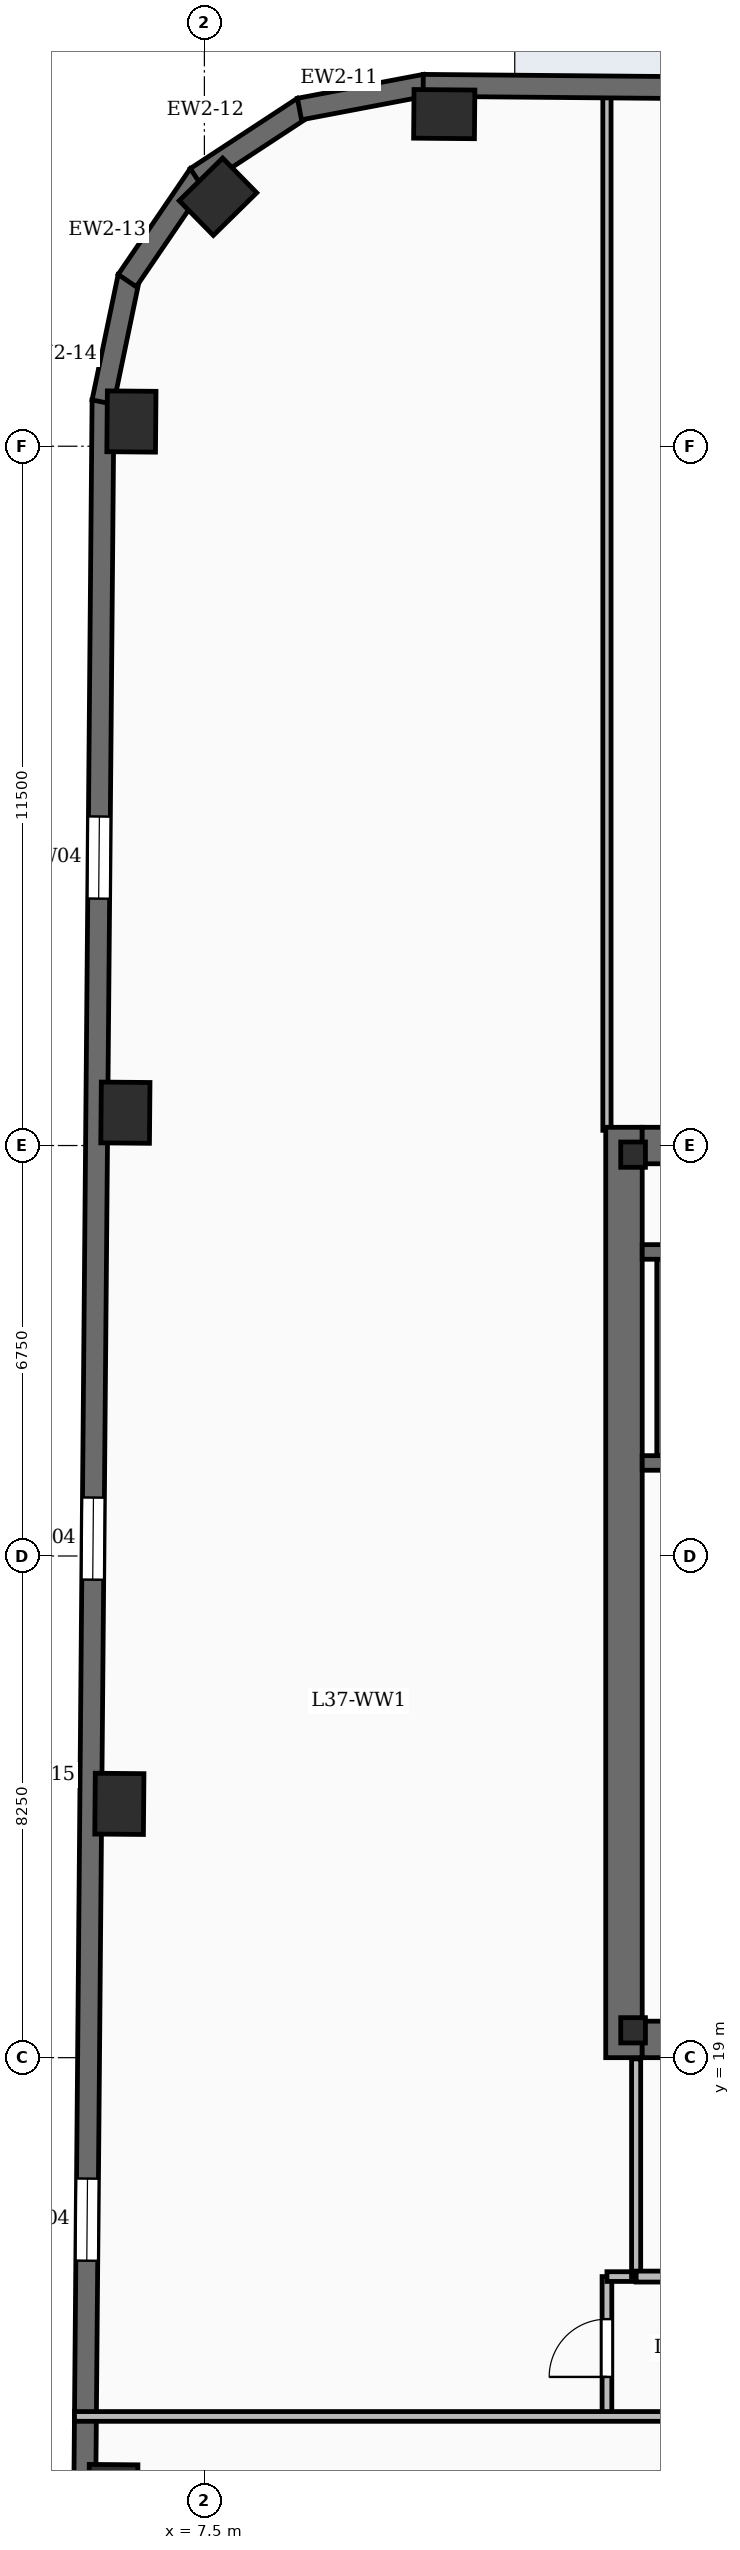
"""IFC4 building model, lengths in metres.
Left out: names, types, materials, properties, quantities, classifications, styles, units other than length and angle.
Written with IfcOpenShell. Run it as: python <this file> out.ifc"""

import sys

from ifc_helpers import new_model, si_unit, direction, frame, frame_2d, origin, origin_2d, place, context, subcontext, project, spatial, rectangle, i_section, extrude, element, fill, save


model = new_model("IFC4")
c1 = context("Model", 3, precision=1e-05, world=origin(), true_north=direction((0.0, 1.0)))
c2 = subcontext(c1, "Body", "Model", "MODEL_VIEW")
j1 = project(units=[si_unit("LENGTHUNIT", "METRE"), si_unit("PLANEANGLEUNIT", "RADIAN")], contexts=[c1])
p1 = place(None, origin())
s1 = spatial("IfcSite", under=j1, at=p1, CompositionType="ELEMENT")
p2 = place(p1, origin())
s2 = spatial("IfcBuilding", under=s1, at=p2, CompositionType="ELEMENT")
p3 = place(p2, frame((0.0, 0.0, 158.45)))
s3 = spatial("IfcBuildingStorey", under=s2, at=p3, CompositionType="ELEMENT", Elevation=158.45)
p4 = place(p3, frame((14.4, 19.0, -0.45), z_axis=(0.0, 0.0, 1.0), x_axis=(0.0, 1.0, 0.0)))
e1 = element("IfcWall", 1, at=p4, inside=s3, PredefinedType="SHEAR", context=c2, shape_type="SweptSolid", body=[
    extrude(rectangle(XDim=15.3, YDim=0.6, at=frame_2d((7.65, 0.0))), origin(), (0.0, 0.0, 1.0), 3.93),
])
for number, where, z_axis, x_axis in (
    (2, (14.7, 19.3, -0.45), (0.0, 0.0, 1.0), (1.0, 0.0, 0.0)),
    (3, (14.7, 34.0, -0.45), (0.0, 0.0, 1.0), (1.0, 0.0, 0.0)),
):
    element("IfcWall", number, at=place(p3, frame(where, z_axis=z_axis, x_axis=x_axis)), inside=s3, PredefinedType="SHEAR", context=c2, shape_type="SweptSolid", body=[
        extrude(rectangle(XDim=9.5, YDim=0.6, at=frame_2d((4.75, 0.0))), origin(), (0.0, 0.0, 1.0), 3.93),
    ])
for number, where, z_axis, x_axis in (
    (4, (14.55, 19.45, -0.45), (0.0, 0.0, 1.0), (1.0, 0.0, 0.0)),
    (5, (14.55, 33.85, -0.45), (0.0, 0.0, 1.0), (1.0, 0.0, 0.0)),
):
    element("IfcColumn", number, at=place(p3, frame(where, z_axis=z_axis, x_axis=x_axis)), inside=s3, PredefinedType="COLUMN", context=c2, shape_type="SweptSolid", body=[
        extrude(i_section(OverallWidth=0.406, OverallDepth=0.416, WebThickness=0.03, FlangeThickness=0.048, FilletRadius=0.02, at=origin_2d()), origin(), (0.0, 0.0, 1.0), 3.93),
    ])
for number, where, z_axis, x_axis in (
    (6, (11.444, 50.962, -0.45), (0.0, 0.0, 1.0), (1.0, -0.009, 0.0)),
    (7, (7.723, 49.603, -0.45), (0.0, 0.0, 1.0), (0.713, 0.701, 0.0)),
    (8, (6.3, 45.906, -0.45), (0.0, 0.0, 1.0), (0.009, 1.0, 0.0)),
    (9, (6.201, 34.54, -0.45), (0.0, 0.0, 1.0), (0.009, 1.0, 0.0)),
    (10, (6.102, 23.174, -0.45), (0.0, 0.0, 1.0), (0.009, 1.0, 0.0)),
    (11, (6.002, 11.808, -0.45), (0.0, 0.0, 1.0), (0.009, 1.0, 0.0)),
):
    element("IfcColumn", number, at=place(p3, frame(where, z_axis=z_axis, x_axis=x_axis)), inside=s3, PredefinedType="COLUMN", context=c2, shape_type="SweptSolid", body=[
        extrude(rectangle(XDim=1.0, YDim=0.8, at=origin_2d()), origin(), (0.0, 0.0, 1.0), 3.93),
    ])
p5 = place(p3, frame((11.098, 51.435, 0.0), z_axis=(0.0, 0.0, 1.0), x_axis=(0.99996191194, -0.008727810138, 0.0)))
e12 = element("IfcWall", 12, at=p5, inside=s3, PredefinedType="SOLIDWALL", context=c2, shape_type="SweptSolid", body=[
    extrude(rectangle(XDim=49.4, YDim=0.36, at=frame_2d((24.7, 0.0))), origin(), (0.0, 0.0, 1.0), 3.48),
])
p6 = place(p5, frame((27.6, 0.0, 0.0)))
e13 = element("IfcOpeningElement", 13, at=p6, cuts=e12, PredefinedType="OPENING", context=c2, shape_type="SweptSolid", body=[
    extrude(rectangle(XDim=1.8, YDim=2.25, at=frame_2d((0.9, 1.125))), frame((0.0, 0.19, 0.0), z_axis=(0.0, -1.0, 0.0), x_axis=(1.0, 0.0, 0.0)), (0.0, 0.0, 1.0), 0.38),
])
p7 = place(p5, frame((8.0, 0.0, 0.88)))
e14 = element("IfcOpeningElement", 14, at=p7, cuts=e12, PredefinedType="OPENING", context=c2, shape_type="SweptSolid", body=[
    extrude(rectangle(XDim=1.8, YDim=2.15, at=frame_2d((0.9, 1.075))), frame((0.0, 0.19, 0.0), z_axis=(0.0, -1.0, 0.0), x_axis=(1.0, 0.0, 0.0)), (0.0, 0.0, 1.0), 0.38),
])
p8 = place(p5, frame((18.8, 0.0, 0.88)))
e15 = element("IfcOpeningElement", 15, at=p8, cuts=e12, PredefinedType="OPENING", context=c2, shape_type="SweptSolid", body=[
    extrude(rectangle(XDim=1.8, YDim=2.15, at=frame_2d((0.9, 1.075))), frame((0.0, 0.19, 0.0), z_axis=(0.0, -1.0, 0.0), x_axis=(1.0, 0.0, 0.0)), (0.0, 0.0, 1.0), 0.38),
])
p9 = place(p5, frame((40.4, 0.0, 0.88)))
e16 = element("IfcOpeningElement", 16, at=p9, cuts=e12, PredefinedType="OPENING", context=c2, shape_type="SweptSolid", body=[
    extrude(rectangle(XDim=1.8, YDim=2.15, at=frame_2d((0.9, 1.075))), frame((0.0, 0.19, 0.0), z_axis=(0.0, -1.0, 0.0), x_axis=(1.0, 0.0, 0.0)), (0.0, 0.0, 1.0), 0.38),
])
p10 = place(p3, frame((9.063, 51.045, 0.0), z_axis=(0.0, 0.0, 1.0), x_axis=(0.982445905584, 0.186547695246, 0.0)))
e17 = element("IfcWall", 17, at=p10, inside=s3, PredefinedType="SOLIDWALL", context=c2, shape_type="SweptSolid", body=[
    extrude(rectangle(XDim=2.107, YDim=0.36, at=frame_2d((1.054, 0.0))), origin(), (0.0, 0.0, 1.0), 3.48),
])
for number, where, z_axis, x_axis in (
    (18, (7.367, 49.916, 0.0), (0.0, 0.0, 1.0), (0.836, 0.548, 0.0)),
    (19, (6.231, 48.223, 0.0), (0.0, 0.0, 1.0), (0.563, 0.827, 0.0)),
    (20, (5.829, 46.225, 0.0), (0.0, 0.0, 1.0), (0.204, 0.979, 0.0)),
):
    element("IfcWall", number, at=place(p3, frame(where, z_axis=z_axis, x_axis=x_axis)), inside=s3, PredefinedType="SOLIDWALL", context=c2, shape_type="SweptSolid", body=[
        extrude(rectangle(XDim=2.107, YDim=0.36, at=frame_2d((1.053, 0.0))), origin(), (0.0, 0.0, 1.0), 3.48),
    ])
p11 = place(p3, frame((5.529, 11.462, 0.0), z_axis=(0.0, 0.0, 1.0), x_axis=(0.008727287311, 0.999961916503, 0.0)))
e21 = element("IfcWall", 21, at=p11, inside=s3, PredefinedType="SOLIDWALL", context=c2, shape_type="SweptSolid", body=[
    extrude(rectangle(XDim=34.8, YDim=0.36, at=frame_2d((17.4, 0.0))), origin(), (0.0, 0.0, 1.0), 3.48),
])
p12 = place(p11, frame((4.2, 0.0, 0.88)))
e22 = element("IfcOpeningElement", 22, at=p12, cuts=e21, PredefinedType="OPENING", context=c2, shape_type="SweptSolid", body=[
    extrude(rectangle(XDim=1.35, YDim=2.2, at=frame_2d((0.675, 1.1))), frame((0.0, 0.19, 0.0), z_axis=(0.0, -1.0, 0.0), x_axis=(1.0, 0.0, 0.0)), (0.0, 0.0, 1.0), 0.38),
])
p13 = place(p11, frame((15.4, 0.0, 0.88)))
e23 = element("IfcOpeningElement", 23, at=p13, cuts=e21, PredefinedType="OPENING", context=c2, shape_type="SweptSolid", body=[
    extrude(rectangle(XDim=1.35, YDim=2.2, at=frame_2d((0.675, 1.1))), frame((0.0, 0.19, 0.0), z_axis=(0.0, -1.0, 0.0), x_axis=(1.0, 0.0, 0.0)), (0.0, 0.0, 1.0), 0.38),
])
p14 = place(p11, frame((26.6, 0.0, 0.88)))
e24 = element("IfcOpeningElement", 24, at=p14, cuts=e21, PredefinedType="OPENING", context=c2, shape_type="SweptSolid", body=[
    extrude(rectangle(XDim=1.35, YDim=2.2, at=frame_2d((0.675, 1.1))), frame((0.0, 0.19, 0.0), z_axis=(0.0, -1.0, 0.0), x_axis=(1.0, 0.0, 0.0)), (0.0, 0.0, 1.0), 0.38),
])
p15 = place(p3, frame((24.2, 28.78, 0.0), z_axis=(0.0, 0.0, 1.0), x_axis=(-1.0, 0.0, 0.0)))
e25 = element("IfcWall", 25, at=p15, inside=s3, PredefinedType="SOLIDWALL", context=c2, shape_type="SweptSolid", body=[
    extrude(rectangle(XDim=9.5, YDim=0.24, at=frame_2d((4.75, 0.0))), origin(), (0.0, 0.0, 1.0), 3.48),
])
p16 = place(p15, frame((7.68, 0.0, 0.0)))
e26 = element("IfcOpeningElement", 26, at=p16, cuts=e25, PredefinedType="OPENING", context=c2, shape_type="SweptSolid", body=[
    extrude(rectangle(XDim=1.1, YDim=2.15, at=frame_2d((0.55, 1.075))), frame((0.0, 0.13, 0.0), z_axis=(0.0, -1.0, 0.0), x_axis=(1.0, 0.0, 0.0)), (0.0, 0.0, 1.0), 0.26),
])
p17 = place(p3, frame((14.7, 32.25, 0.0), z_axis=(0.0, 0.0, 1.0), x_axis=(1.0, 0.0, 0.0)))
e27 = element("IfcWall", 27, at=p17, inside=s3, PredefinedType="SOLIDWALL", context=c2, shape_type="SweptSolid", body=[
    extrude(rectangle(XDim=9.5, YDim=0.24, at=frame_2d((4.75, 0.0))), origin(), (0.0, 0.0, 1.0), 3.48),
])
p18 = place(p3, frame((15.06, 28.9, 0.0), z_axis=(0.0, 0.0, 1.0), x_axis=(0.0, 1.0, 0.0)))
e28 = element("IfcWall", 28, at=p18, inside=s3, PredefinedType="SOLIDWALL", context=c2, shape_type="SweptSolid", body=[
    extrude(rectangle(XDim=3.23, YDim=0.24, at=frame_2d((1.615, 0.0))), origin(), (0.0, 0.0, 1.0), 3.48),
])
p19 = place(p3, frame((14.6, 15.4, 0.0), z_axis=(0.0, 0.0, 1.0), x_axis=(1.0, 0.0, 0.0)))
e29 = element("IfcWall", 29, at=p19, inside=s3, PredefinedType="PARTITIONING", context=c2, shape_type="SweptSolid", body=[
    extrude(rectangle(XDim=9.9, YDim=0.18, at=frame_2d((4.95, 0.0))), origin(), (0.0, 0.0, 1.0), 2.54),
])
p20 = place(p19, frame((0.74, 0.0, 0.0)))
e30 = element("IfcOpeningElement", 30, at=p20, cuts=e29, PredefinedType="OPENING", context=c2, shape_type="SweptSolid", body=[
    extrude(rectangle(XDim=0.92, YDim=2.1, at=frame_2d((0.46, 1.05))), frame((0.0, 0.1, 0.0), z_axis=(0.0, -1.0, 0.0), x_axis=(1.0, 0.0, 0.0)), (0.0, 0.0, 1.0), 0.2),
])
p21 = place(p19, frame((3.19, 0.0, 0.0)))
e31 = element("IfcOpeningElement", 31, at=p21, cuts=e29, PredefinedType="OPENING", context=c2, shape_type="SweptSolid", body=[
    extrude(rectangle(XDim=0.92, YDim=2.1, at=frame_2d((0.46, 1.05))), frame((0.0, 0.1, 0.0), z_axis=(0.0, -1.0, 0.0), x_axis=(1.0, 0.0, 0.0)), (0.0, 0.0, 1.0), 0.2),
])
p22 = place(p19, frame((5.69, 0.0, 0.0)))
e32 = element("IfcOpeningElement", 32, at=p22, cuts=e29, PredefinedType="OPENING", context=c2, shape_type="SweptSolid", body=[
    extrude(rectangle(XDim=0.92, YDim=2.1, at=frame_2d((0.46, 1.05))), frame((0.0, 0.1, 0.0), z_axis=(0.0, -1.0, 0.0), x_axis=(1.0, 0.0, 0.0)), (0.0, 0.0, 1.0), 0.2),
])
p23 = place(p19, frame((8.19, 0.0, 0.0)))
e33 = element("IfcOpeningElement", 33, at=p23, cuts=e29, PredefinedType="OPENING", context=c2, shape_type="SweptSolid", body=[
    extrude(rectangle(XDim=0.92, YDim=2.1, at=frame_2d((0.46, 1.05))), frame((0.0, 0.1, 0.0), z_axis=(0.0, -1.0, 0.0), x_axis=(1.0, 0.0, 0.0)), (0.0, 0.0, 1.0), 0.2),
])
p24 = place(p3, frame((14.6, 15.4, 0.0), z_axis=(0.0, 0.0, 1.0), x_axis=(0.0, 1.0, 0.0)))
e34 = element("IfcWall", 34, at=p24, inside=s3, PredefinedType="PARTITIONING", context=c2, shape_type="SweptSolid", body=[
    extrude(rectangle(XDim=3.58, YDim=0.15, at=frame_2d((1.79, 0.0))), origin(), (0.0, 0.0, 1.0), 2.54),
])
p25 = place(p3, frame((5.364, 13.1, 0.0), z_axis=(0.0, 0.0, 1.0), x_axis=(1.0, 0.0, 0.0)))
e35 = element("IfcWall", 35, at=p25, inside=s3, PredefinedType="PARTITIONING", context=c2, shape_type="SweptSolid", body=[
    extrude(rectangle(XDim=60.202, YDim=0.16, at=frame_2d((30.101, 0.0))), origin(), (0.0, 0.0, 1.0), 2.54),
])
p26 = place(p25, frame((14.361, 0.0, 0.0)))
e36 = element("IfcOpeningElement", 36, at=p26, cuts=e35, PredefinedType="OPENING", context=c2, shape_type="SweptSolid", body=[
    extrude(rectangle(XDim=0.95, YDim=2.15, at=frame_2d((0.475, 1.075))), frame((0.0, 0.09, 0.0), z_axis=(0.0, -1.0, 0.0), x_axis=(1.0, 0.0, 0.0)), (0.0, 0.0, 1.0), 0.18),
])
p27 = place(p25, frame((23.311, 0.0, 0.0)))
e37 = element("IfcOpeningElement", 37, at=p27, cuts=e35, PredefinedType="OPENING", context=c2, shape_type="SweptSolid", body=[
    extrude(rectangle(XDim=0.95, YDim=2.15, at=frame_2d((0.475, 1.075))), frame((0.0, 0.09, 0.0), z_axis=(0.0, -1.0, 0.0), x_axis=(1.0, 0.0, 0.0)), (0.0, 0.0, 1.0), 0.18),
])
p28 = place(p25, frame((36.161, 0.0, 0.0)))
e38 = element("IfcOpeningElement", 38, at=p28, cuts=e35, PredefinedType="OPENING", context=c2, shape_type="SweptSolid", body=[
    extrude(rectangle(XDim=0.95, YDim=2.15, at=frame_2d((0.475, 1.075))), frame((0.0, 0.09, 0.0), z_axis=(0.0, -1.0, 0.0), x_axis=(1.0, 0.0, 0.0)), (0.0, 0.0, 1.0), 0.18),
])
p29 = place(p25, frame((47.911, 0.0, 0.0)))
e39 = element("IfcOpeningElement", 39, at=p29, cuts=e35, PredefinedType="OPENING", context=c2, shape_type="SweptSolid", body=[
    extrude(rectangle(XDim=0.95, YDim=2.15, at=frame_2d((0.475, 1.075))), frame((0.0, 0.09, 0.0), z_axis=(0.0, -1.0, 0.0), x_axis=(1.0, 0.0, 0.0)), (0.0, 0.0, 1.0), 0.18),
])
p30 = place(p3, frame((14.12, 34.25, 0.0), z_axis=(0.0, 0.0, 1.0), x_axis=(0.0, 1.0, 0.0)))
e40 = element("IfcWall", 40, at=p30, inside=s3, PredefinedType="PARTITIONING", context=c2, shape_type="SweptSolid", body=[
    extrude(rectangle(XDim=17.098, YDim=0.135, at=frame_2d((8.549, 0.0))), origin(), (0.0, 0.0, 1.0), 2.54),
])
p31 = place(p3, frame((14.12, 13.1, 0.0), z_axis=(0.0, 0.0, 1.0), x_axis=(0.0, 1.0, 0.0)))
e41 = element("IfcWall", 41, at=p31, inside=s3, PredefinedType="PARTITIONING", context=c2, shape_type="SweptSolid", body=[
    extrude(rectangle(XDim=2.3, YDim=0.16, at=frame_2d((1.15, 0.0))), origin(), (0.0, 0.0, 1.0), 2.54),
])
p32 = place(p31, frame((0.65, 0.0, 0.0)))
e42 = element("IfcOpeningElement", 42, at=p32, cuts=e41, PredefinedType="OPENING", context=c2, shape_type="SweptSolid", body=[
    extrude(rectangle(XDim=0.95, YDim=2.15, at=frame_2d((0.475, 1.075))), frame((0.0, 0.09, 0.0), z_axis=(0.0, -1.0, 0.0), x_axis=(1.0, 0.0, 0.0)), (0.0, 0.0, 1.0), 0.18),
])
p33 = place(p3, frame((14.12, 15.4, 0.0), z_axis=(0.0, 0.0, 1.0), x_axis=(1.0, 0.0, 0.0)))
e43 = element("IfcWall", 43, at=p33, inside=s3, PredefinedType="PARTITIONING", context=c2, shape_type="SweptSolid", body=[
    extrude(rectangle(XDim=0.5, YDim=0.16, at=frame_2d((0.25, 0.0))), origin(), (0.0, 0.0, 1.0), 2.54),
])
p34 = place(p12, origin())
e44 = element("IfcWindow", 44, at=p34, inside=s3, PartitioningType="SINGLE_PANEL", PredefinedType="WINDOW", context=c2, shape_type="SweptSolid", body=[
    extrude(rectangle(XDim=1.35, YDim=2.2, at=frame_2d((0.675, 1.1))), frame((0.0, 0.03, 0.0), z_axis=(0.0, -1.0, 0.0), x_axis=(1.0, 0.0, 0.0)), (0.0, 0.0, 1.0), 0.06),
])
fill(e22, e44)
p35 = place(p13, origin())
e45 = element("IfcWindow", 45, at=p35, inside=s3, PartitioningType="SINGLE_PANEL", PredefinedType="WINDOW", context=c2, shape_type="SweptSolid", body=[
    extrude(rectangle(XDim=1.35, YDim=2.2, at=frame_2d((0.675, 1.1))), frame((0.0, 0.03, 0.0), z_axis=(0.0, -1.0, 0.0), x_axis=(1.0, 0.0, 0.0)), (0.0, 0.0, 1.0), 0.06),
])
fill(e23, e45)
p36 = place(p14, origin())
e46 = element("IfcWindow", 46, at=p36, inside=s3, PartitioningType="SINGLE_PANEL", PredefinedType="WINDOW", context=c2, shape_type="SweptSolid", body=[
    extrude(rectangle(XDim=1.35, YDim=2.2, at=frame_2d((0.675, 1.1))), frame((0.0, 0.03, 0.0), z_axis=(0.0, -1.0, 0.0), x_axis=(1.0, 0.0, 0.0)), (0.0, 0.0, 1.0), 0.06),
])
fill(e24, e46)
p37 = place(p32, origin())
e47 = element("IfcDoor", 47, at=p37, inside=s3, OperationType="SINGLE_SWING_LEFT", PredefinedType="DOOR", context=c2, shape_type="SweptSolid", body=[
    extrude(rectangle(XDim=0.95, YDim=2.15, at=frame_2d((0.475, 1.075))), frame((0.0, 0.025, 0.0), z_axis=(0.0, -1.0, 0.0), x_axis=(1.0, 0.0, 0.0)), (0.0, 0.0, 1.0), 0.05),
])
fill(e42, e47)
save(model, sys.argv[1])
